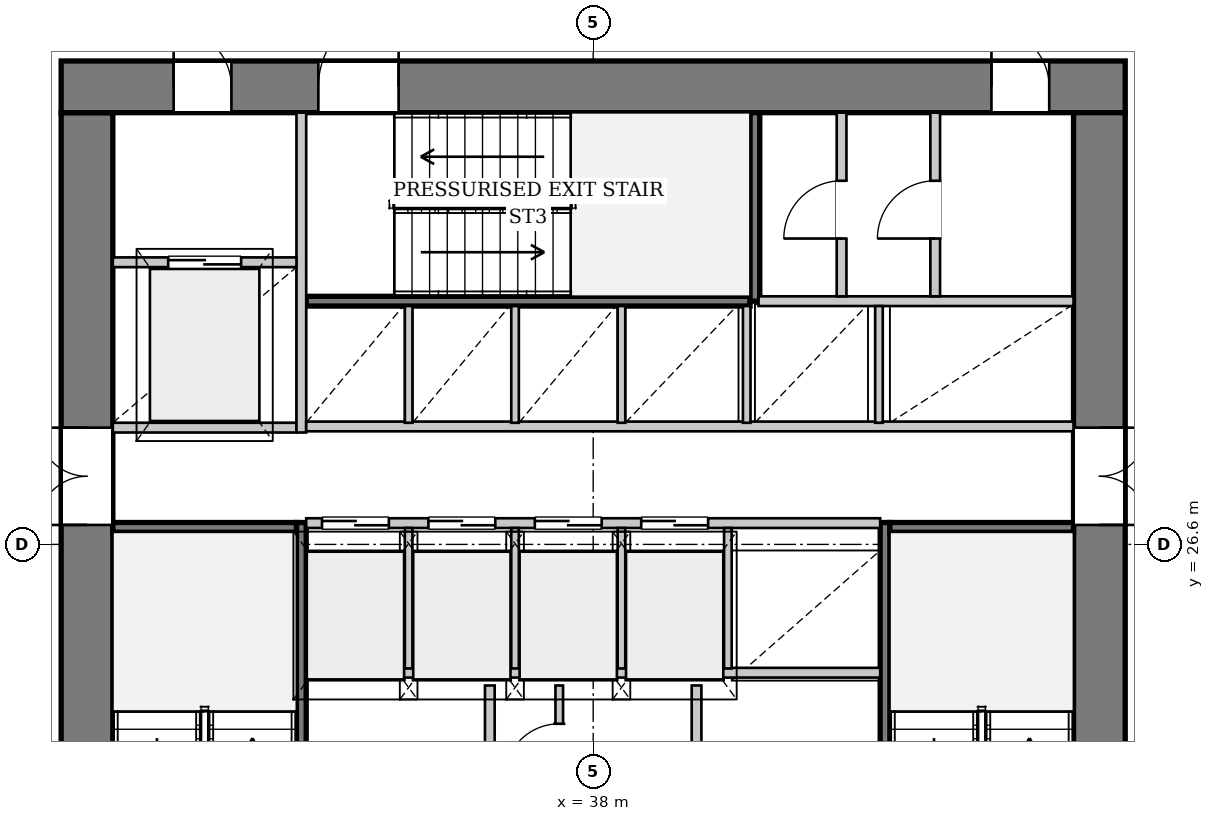
"""IFC4 building model, lengths in metres.
Left out: names, types, materials, properties, quantities, classifications, styles, units other than length and angle.
Written with IfcOpenShell. Run it as: python <this file> out.ifc"""

import sys

from ifc_helpers import new_model, si_unit, direction, frame, frame_2d, origin, place, context, subcontext, project, spatial, rectangle, extrude, source, transform, mapped, element, fill, save


model = new_model("IFC4")
c1 = context("Model", 3, precision=1e-05, world=origin(), true_north=direction((0.0, 1.0)))
c2 = subcontext(c1, "Body", "Model", "MODEL_VIEW")
j1 = project(units=[si_unit("LENGTHUNIT", "METRE"), si_unit("PLANEANGLEUNIT", "RADIAN")], contexts=[c1])
p1 = place(None, origin())
s1 = spatial("IfcSite", under=j1, at=p1, CompositionType="ELEMENT")
p2 = place(p1, origin())
s2 = spatial("IfcBuilding", under=s1, at=p2, CompositionType="ELEMENT")
p3 = place(p2, frame((0.0, 0.0, 36.4)))
s3 = spatial("IfcBuildingStorey", under=s2, at=p3, CompositionType="ELEMENT", Elevation=36.4)
p4 = place(p3, frame((29.675, 19.5, 0.0), z_axis=(0.0, 0.0, 1.0), x_axis=(0.0, 1.0, 0.0)))
e1 = element("IfcWall", 1, at=p4, inside=s3, PredefinedType="SHEAR", context=c2, shape_type="SweptSolid", body=[
    extrude(rectangle(XDim=14.2, YDim=0.85, at=frame_2d((7.1, 0.0))), origin(), (0.0, 0.0, 1.0), 3.3),
])
p5 = place(p4, frame((7.42, 0.0, 0.0)))
e2 = element("IfcOpeningElement", 2, at=p5, cuts=e1, PredefinedType="OPENING", context=c2, shape_type="SweptSolid", body=[
    extrude(rectangle(XDim=1.6, YDim=2.2, at=frame_2d((0.8, 1.1))), frame((0.0, 0.435, 0.0), z_axis=(0.0, -1.0, 0.0), x_axis=(1.0, 0.0, 0.0)), (0.0, 0.0, 1.0), 0.87),
])
p6 = place(p3, frame((29.25, 34.125, 0.0), z_axis=(0.0, 0.0, 1.0), x_axis=(1.0, 0.0, 0.0)))
e3 = element("IfcWall", 3, at=p6, inside=s3, PredefinedType="SHEAR", context=c2, shape_type="SweptSolid", body=[
    extrude(rectangle(XDim=17.5, YDim=0.85, at=frame_2d((8.75, 0.0))), origin(), (0.0, 0.0, 1.0), 3.3),
])
p7 = place(p6, frame((1.85, 0.0, 0.0)))
e4 = element("IfcOpeningElement", 4, at=p7, cuts=e3, PredefinedType="OPENING", context=c2, shape_type="SweptSolid", body=[
    extrude(rectangle(XDim=0.95, YDim=2.1, at=frame_2d((0.475, 1.05))), frame((0.0, 0.435, 0.0), z_axis=(0.0, -1.0, 0.0), x_axis=(1.0, 0.0, 0.0)), (0.0, 0.0, 1.0), 0.87),
])
p8 = place(p6, frame((4.23, 0.0, 0.0)))
e5 = element("IfcOpeningElement", 5, at=p8, cuts=e3, PredefinedType="OPENING", context=c2, shape_type="SweptSolid", body=[
    extrude(rectangle(XDim=1.32, YDim=2.2, at=frame_2d((0.66, 1.1))), frame((0.0, 0.435, 0.0), z_axis=(0.0, -1.0, 0.0), x_axis=(1.0, 0.0, 0.0)), (0.0, 0.0, 1.0), 0.87),
])
p9 = place(p6, frame((15.3, 0.0, 0.0)))
e6 = element("IfcOpeningElement", 6, at=p9, cuts=e3, PredefinedType="OPENING", context=c2, shape_type="SweptSolid", body=[
    extrude(rectangle(XDim=0.95, YDim=2.1, at=frame_2d((0.475, 1.05))), frame((0.0, 0.435, 0.0), z_axis=(0.0, -1.0, 0.0), x_axis=(1.0, 0.0, 0.0)), (0.0, 0.0, 1.0), 0.87),
])
p10 = place(p3, frame((46.325, 33.7, 0.0), z_axis=(0.0, 0.0, 1.0), x_axis=(0.0, -1.0, 0.0)))
e7 = element("IfcWall", 7, at=p10, inside=s3, PredefinedType="SHEAR", context=c2, shape_type="SweptSolid", body=[
    extrude(rectangle(XDim=14.2, YDim=0.85, at=frame_2d((7.1, 0.0))), origin(), (0.0, 0.0, 1.0), 3.3),
])
p11 = place(p10, frame((5.18, 0.0, 0.0)))
e8 = element("IfcOpeningElement", 8, at=p11, cuts=e7, PredefinedType="OPENING", context=c2, shape_type="SweptSolid", body=[
    extrude(rectangle(XDim=1.6, YDim=2.2, at=frame_2d((0.8, 1.1))), frame((0.0, 0.435, 0.0), z_axis=(0.0, -1.0, 0.0), x_axis=(1.0, 0.0, 0.0)), (0.0, 0.0, 1.0), 0.87),
])
p12 = place(p3, frame((33.2, 19.5, 0.0), z_axis=(0.0, 0.0, 1.0), x_axis=(0.0, 1.0, 0.0)))
e9 = element("IfcWall", 9, at=p12, inside=s3, PredefinedType="PARTITIONING", context=c2, shape_type="SweptSolid", body=[
    extrude(rectangle(XDim=7.46, YDim=0.16, at=frame_2d((3.73, 0.0))), origin(), (0.0, 0.0, 1.0), 3.3),
])
p13 = place(p12, frame((0.08, 0.0, 0.0)))
e10 = element("IfcOpeningElement", 10, at=p13, cuts=e9, PredefinedType="OPENING", context=c2, shape_type="SweptSolid", body=[
    extrude(rectangle(XDim=1.32, YDim=2.2, at=frame_2d((0.66, 1.1))), frame((0.0, 0.09, 0.0), z_axis=(0.0, -1.0, 0.0), x_axis=(1.0, 0.0, 0.0)), (0.0, 0.0, 1.0), 0.18),
])
p14 = place(p3, frame((30.1, 26.88, 0.0), z_axis=(0.0, 0.0, 1.0), x_axis=(1.0, 0.0, 0.0)))
e11 = element("IfcWall", 11, at=p14, inside=s3, PredefinedType="PARTITIONING", context=c2, shape_type="SweptSolid", body=[
    extrude(rectangle(XDim=3.02, YDim=0.16, at=frame_2d((1.51, 0.0))), origin(), (0.0, 0.0, 1.0), 3.3),
])
p15 = place(p3, frame((42.8, 26.96, 0.0), z_axis=(0.0, 0.0, 1.0), x_axis=(0.0, -1.0, 0.0)))
e12 = element("IfcWall", 12, at=p15, inside=s3, PredefinedType="PARTITIONING", context=c2, shape_type="SweptSolid", body=[
    extrude(rectangle(XDim=7.46, YDim=0.16, at=frame_2d((3.73, 0.0))), origin(), (0.0, 0.0, 1.0), 3.3),
])
p16 = place(p15, frame((6.06, 0.0, 0.0)))
e13 = element("IfcOpeningElement", 13, at=p16, cuts=e12, PredefinedType="OPENING", context=c2, shape_type="SweptSolid", body=[
    extrude(rectangle(XDim=1.32, YDim=2.2, at=frame_2d((0.66, 1.1))), frame((0.0, 0.09, 0.0), z_axis=(0.0, -1.0, 0.0), x_axis=(1.0, 0.0, 0.0)), (0.0, 0.0, 1.0), 0.18),
])
p17 = place(p3, frame((42.88, 26.88, 0.0), z_axis=(0.0, 0.0, 1.0), x_axis=(1.0, 0.0, 0.0)))
e14 = element("IfcWall", 14, at=p17, inside=s3, PredefinedType="PARTITIONING", context=c2, shape_type="SweptSolid", body=[
    extrude(rectangle(XDim=3.02, YDim=0.16, at=frame_2d((1.51, 0.0))), origin(), (0.0, 0.0, 1.0), 3.3),
])
p18 = place(p3, frame((33.28, 30.6, 0.0), z_axis=(0.0, 0.0, 1.0), x_axis=(1.0, 0.0, 0.0)))
e15 = element("IfcWall", 15, at=p18, inside=s3, PredefinedType="PARTITIONING", context=c2, shape_type="SweptSolid", body=[
    extrude(rectangle(XDim=7.3, YDim=0.16, at=frame_2d((3.65, 0.0))), origin(), (0.0, 0.0, 1.0), 3.3),
])
p19 = place(p3, frame((40.66, 30.6, 0.0), z_axis=(0.0, 0.0, 1.0), x_axis=(0.0, 1.0, 0.0)))
e16 = element("IfcWall", 16, at=p19, inside=s3, PredefinedType="PARTITIONING", context=c2, shape_type="SweptSolid", body=[
    extrude(rectangle(XDim=3.1, YDim=0.16, at=frame_2d((1.55, 0.0))), origin(), (0.0, 0.0, 1.0), 3.3),
])
p20 = place(p3, frame((36.3, 19.5, 0.0), z_axis=(0.0, 0.0, 1.0), x_axis=(0.0, 1.0, 0.0)))
e17 = element("IfcWall", 17, at=p20, inside=s3, PredefinedType="PARTITIONING", context=c2, shape_type="SweptSolid", body=[
    extrude(rectangle(XDim=4.78, YDim=0.16, at=frame_2d((2.39, 0.0))), origin(), (0.0, 0.0, 1.0), 3.3),
])
p21 = place(p20, frame((0.6, 0.0, 0.0)))
e18 = element("IfcOpeningElement", 18, at=p21, cuts=e17, PredefinedType="OPENING", context=c2, shape_type="SweptSolid", body=[
    extrude(rectangle(XDim=1.2, YDim=2.2, at=frame_2d((0.6, 1.1))), frame((0.0, 0.09, 0.0), z_axis=(0.0, -1.0, 0.0), x_axis=(1.0, 0.0, 0.0)), (0.0, 0.0, 1.0), 0.18),
])
p22 = place(p20, frame((2.65, 0.0, 0.0)))
e19 = element("IfcOpeningElement", 19, at=p22, cuts=e17, PredefinedType="OPENING", context=c2, shape_type="SweptSolid", body=[
    extrude(rectangle(XDim=0.95, YDim=2.1, at=frame_2d((0.475, 1.05))), frame((0.0, 0.09, 0.0), z_axis=(0.0, -1.0, 0.0), x_axis=(1.0, 0.0, 0.0)), (0.0, 0.0, 1.0), 0.18),
])
p23 = place(p3, frame((39.7, 24.28, 0.0), z_axis=(0.0, 0.0, 1.0), x_axis=(0.0, -1.0, 0.0)))
e20 = element("IfcWall", 20, at=p23, inside=s3, PredefinedType="PARTITIONING", context=c2, shape_type="SweptSolid", body=[
    extrude(rectangle(XDim=4.78, YDim=0.16, at=frame_2d((2.39, 0.0))), origin(), (0.0, 0.0, 1.0), 3.3),
])
p24 = place(p23, frame((3.12, 0.0, 0.0)))
e21 = element("IfcOpeningElement", 21, at=p24, cuts=e20, PredefinedType="OPENING", context=c2, shape_type="SweptSolid", body=[
    extrude(rectangle(XDim=1.2, YDim=2.2, at=frame_2d((0.6, 1.1))), frame((0.0, 0.09, 0.0), z_axis=(0.0, -1.0, 0.0), x_axis=(1.0, 0.0, 0.0)), (0.0, 0.0, 1.0), 0.18),
])
p25 = place(p3, frame((33.28, 24.49, 0.0), z_axis=(0.0, 0.0, 1.0), x_axis=(1.0, 0.0, 0.0)))
e22 = element("IfcWall", 22, at=p25, inside=s3, PredefinedType="PARTITIONING", context=c2, shape_type="SweptSolid", body=[
    extrude(rectangle(XDim=9.44, YDim=0.16, at=frame_2d((4.72, 0.0))), origin(), (0.0, 0.0, 1.0), 3.3),
])
p26 = place(p3, frame((37.442, 22.1, 0.0), z_axis=(0.0, 0.0, 1.0), x_axis=(0.0, 1.0, 0.0)))
e23 = element("IfcWall", 23, at=p26, inside=s3, PredefinedType="PARTITIONING", context=c2, shape_type="SweptSolid", body=[
    extrude(rectangle(XDim=2.18, YDim=0.125, at=frame_2d((1.09, 0.0))), origin(), (0.0, 0.0, 1.0), 3.3),
])
p27 = place(p26, frame((0.65, 0.0, 0.0)))
e24 = element("IfcOpeningElement", 24, at=p27, cuts=e23, PredefinedType="OPENING", context=c2, shape_type="SweptSolid", body=[
    extrude(rectangle(XDim=0.9, YDim=2.1, at=frame_2d((0.45, 1.05))), frame((0.0, 0.073, 0.0), z_axis=(0.0, -1.0, 0.0), x_axis=(1.0, 0.0, 0.0)), (0.0, 0.0, 1.0), 0.145),
])
p28 = place(p3, frame((30.1, 28.52, 0.0), z_axis=(0.0, 0.0, 1.0), x_axis=(1.0, 0.0, 0.0)))
e25 = element("IfcWall", 25, at=p28, inside=s3, PredefinedType="PARTITIONING", context=c2, shape_type="SweptSolid", body=[
    extrude(rectangle(XDim=3.02, YDim=0.16, at=frame_2d((1.51, 0.0))), origin(), (0.0, 0.0, 1.0), 3.3),
])
p29 = place(p3, frame((33.2, 28.44, 0.0), z_axis=(0.0, 0.0, 1.0), x_axis=(0.0, 1.0, 0.0)))
e26 = element("IfcWall", 26, at=p29, inside=s3, PredefinedType="PARTITIONING", context=c2, shape_type="SweptSolid", body=[
    extrude(rectangle(XDim=5.26, YDim=0.16, at=frame_2d((2.63, 0.0))), origin(), (0.0, 0.0, 1.0), 3.3),
])
p30 = place(p3, frame((30.1, 31.24, 0.0), z_axis=(0.0, 0.0, 1.0), x_axis=(1.0, 0.0, 0.0)))
e27 = element("IfcWall", 27, at=p30, inside=s3, PredefinedType="PARTITIONING", context=c2, shape_type="SweptSolid", body=[
    extrude(rectangle(XDim=3.02, YDim=0.16, at=frame_2d((1.51, 0.0))), origin(), (0.0, 0.0, 1.0), 3.3),
])
p31 = place(p30, frame((0.91, 0.0, 0.0)))
e28 = element("IfcOpeningElement", 28, at=p31, cuts=e27, PredefinedType="OPENING", context=c2, shape_type="SweptSolid", body=[
    extrude(rectangle(XDim=1.2, YDim=2.2, at=frame_2d((0.6, 1.1))), frame((0.0, 0.09, 0.0), z_axis=(0.0, -1.0, 0.0), x_axis=(1.0, 0.0, 0.0)), (0.0, 0.0, 1.0), 0.18),
])
p32 = place(p3, frame((33.28, 26.95, 0.0), z_axis=(0.0, 0.0, 1.0), x_axis=(1.0, 0.0, 0.0)))
e29 = element("IfcWall", 29, at=p32, inside=s3, PredefinedType="PARTITIONING", context=c2, shape_type="SweptSolid", body=[
    extrude(rectangle(XDim=9.44, YDim=0.16, at=frame_2d((4.72, 0.0))), origin(), (0.0, 0.0, 1.0), 3.3),
])
p33 = place(p32, frame((0.26, 0.0, 0.0)))
e30 = element("IfcOpeningElement", 30, at=p33, cuts=e29, PredefinedType="OPENING", context=c2, shape_type="SweptSolid", body=[
    extrude(rectangle(XDim=1.1, YDim=2.2, at=frame_2d((0.55, 1.1))), frame((0.0, 0.09, 0.0), z_axis=(0.0, -1.0, 0.0), x_axis=(1.0, 0.0, 0.0)), (0.0, 0.0, 1.0), 0.18),
])
p34 = place(p32, frame((2.01, 0.0, 0.0)))
e31 = element("IfcOpeningElement", 31, at=p34, cuts=e29, PredefinedType="OPENING", context=c2, shape_type="SweptSolid", body=[
    extrude(rectangle(XDim=1.1, YDim=2.2, at=frame_2d((0.55, 1.1))), frame((0.0, 0.09, 0.0), z_axis=(0.0, -1.0, 0.0), x_axis=(1.0, 0.0, 0.0)), (0.0, 0.0, 1.0), 0.18),
])
p35 = place(p32, frame((3.76, 0.0, 0.0)))
e32 = element("IfcOpeningElement", 32, at=p35, cuts=e29, PredefinedType="OPENING", context=c2, shape_type="SweptSolid", body=[
    extrude(rectangle(XDim=1.1, YDim=2.2, at=frame_2d((0.55, 1.1))), frame((0.0, 0.09, 0.0), z_axis=(0.0, -1.0, 0.0), x_axis=(1.0, 0.0, 0.0)), (0.0, 0.0, 1.0), 0.18),
])
p36 = place(p32, frame((5.51, 0.0, 0.0)))
e33 = element("IfcOpeningElement", 33, at=p36, cuts=e29, PredefinedType="OPENING", context=c2, shape_type="SweptSolid", body=[
    extrude(rectangle(XDim=1.1, YDim=2.2, at=frame_2d((0.55, 1.1))), frame((0.0, 0.09, 0.0), z_axis=(0.0, -1.0, 0.0), x_axis=(1.0, 0.0, 0.0)), (0.0, 0.0, 1.0), 0.18),
])
for number, where, z_axis, x_axis in (
    (34, (34.965, 24.56, 0.0), (0.0, 0.0, 1.0), (0.0, 1.0, 0.0)),
    (35, (36.715, 24.56, 0.0), (0.0, 0.0, 1.0), (0.0, 1.0, 0.0)),
    (36, (38.465, 24.56, 0.0), (0.0, 0.0, 1.0), (0.0, 1.0, 0.0)),
    (37, (40.215, 24.56, 0.0), (0.0, 0.0, 1.0), (0.0, 1.0, 0.0)),
):
    element("IfcWall", number, at=place(p3, frame(where, z_axis=z_axis, x_axis=x_axis)), inside=s3, PredefinedType="PARTITIONING", context=c2, shape_type="SweptSolid", body=[
        extrude(rectangle(XDim=2.31, YDim=0.125, at=frame_2d((1.155, 0.0))), origin(), (0.0, 0.0, 1.0), 3.3),
    ])
p37 = place(p3, frame((33.28, 28.54, 0.0), z_axis=(0.0, 0.0, 1.0), x_axis=(1.0, 0.0, 0.0)))
e38 = element("IfcWall", 38, at=p37, inside=s3, PredefinedType="PARTITIONING", context=c2, shape_type="SweptSolid", body=[
    extrude(rectangle(XDim=12.62, YDim=0.16, at=frame_2d((6.31, 0.0))), origin(), (0.0, 0.0, 1.0), 3.3),
])
p38 = place(p3, frame((40.72, 30.6, 0.0), z_axis=(0.0, 0.0, 1.0), x_axis=(1.0, 0.0, 0.0)))
e39 = element("IfcWall", 39, at=p38, inside=s3, PredefinedType="PARTITIONING", context=c2, shape_type="SweptSolid", body=[
    extrude(rectangle(XDim=5.18, YDim=0.16, at=frame_2d((2.59, 0.0))), origin(), (0.0, 0.0, 1.0), 3.3),
])
for number, where, z_axis, x_axis in (
    (40, (34.965, 28.6, 0.0), (0.0, 0.0, 1.0), (0.0, 1.0, 0.0)),
    (41, (36.715, 28.6, 0.0), (0.0, 0.0, 1.0), (0.0, 1.0, 0.0)),
    (42, (38.465, 28.6, 0.0), (0.0, 0.0, 1.0), (0.0, 1.0, 0.0)),
    (43, (40.525, 28.6, 0.0), (0.0, 0.0, 1.0), (0.0, 1.0, 0.0)),
    (44, (42.7, 28.6, 0.0), (0.0, 0.0, 1.0), (0.0, 1.0, 0.0)),
):
    element("IfcWall", number, at=place(p3, frame(where, z_axis=z_axis, x_axis=x_axis)), inside=s3, PredefinedType="PARTITIONING", context=c2, shape_type="SweptSolid", body=[
        extrude(rectangle(XDim=1.92, YDim=0.125, at=frame_2d((0.96, 0.0))), origin(), (0.0, 0.0, 1.0), 3.3),
    ])
p39 = place(p3, frame((42.085, 30.68, 0.0), z_axis=(0.0, 0.0, 1.0), x_axis=(0.0, 1.0, 0.0)))
e45 = element("IfcWall", 45, at=p39, inside=s3, PredefinedType="PARTITIONING", context=c2, shape_type="SweptSolid", body=[
    extrude(rectangle(XDim=3.02, YDim=0.16, at=frame_2d((1.51, 0.0))), origin(), (0.0, 0.0, 1.0), 3.3),
])
p40 = place(p39, frame((0.95, 0.0, 0.0)))
e46 = element("IfcOpeningElement", 46, at=p40, cuts=e45, PredefinedType="OPENING", context=c2, shape_type="SweptSolid", body=[
    extrude(rectangle(XDim=0.95, YDim=2.1, at=frame_2d((0.475, 1.05))), frame((0.0, 0.09, 0.0), z_axis=(0.0, -1.0, 0.0), x_axis=(1.0, 0.0, 0.0)), (0.0, 0.0, 1.0), 0.18),
])
p41 = place(p3, frame((43.625, 30.68, 0.0), z_axis=(0.0, 0.0, 1.0), x_axis=(0.0, 1.0, 0.0)))
e47 = element("IfcWall", 47, at=p41, inside=s3, PredefinedType="PARTITIONING", context=c2, shape_type="SweptSolid", body=[
    extrude(rectangle(XDim=3.02, YDim=0.16, at=frame_2d((1.51, 0.0))), origin(), (0.0, 0.0, 1.0), 3.3),
])
p42 = place(p41, frame((0.95, 0.0, 0.0)))
e48 = element("IfcOpeningElement", 48, at=p42, cuts=e47, PredefinedType="OPENING", context=c2, shape_type="SweptSolid", body=[
    extrude(rectangle(XDim=0.95, YDim=2.1, at=frame_2d((0.475, 1.05))), frame((0.0, 0.09, 0.0), z_axis=(0.0, -1.0, 0.0), x_axis=(1.0, 0.0, 0.0)), (0.0, 0.0, 1.0), 0.18),
])
m1 = source(origin(), c2, "Body", "SweptSolid", [
    extrude(rectangle(XDim=1.6, YDim=2.2, at=frame_2d((0.8, 1.1))), frame((0.0, 0.025, 0.0), z_axis=(0.0, -1.0, 0.0), x_axis=(1.0, 0.0, 0.0)), (0.0, 0.0, 1.0), 0.05),
])
p43 = place(p5, origin())
e49 = element("IfcDoor", 49, at=p43, inside=s3, OperationType="DOUBLE_DOOR_SINGLE_SWING", PredefinedType="DOOR", context=c2, shape_type="MappedRepresentation", body=[
    mapped(m1, transform((0.0, 0.0, 0.0), x_axis=(1.0, 0.0, 0.0), y_axis=(0.0, 1.0, 0.0), z_axis=(0.0, 0.0, 1.0), scale=1.0)),
])
fill(e2, e49)
m2 = source(origin(), c2, "Body", "SweptSolid", [
    extrude(rectangle(XDim=0.95, YDim=2.1, at=frame_2d((0.475, 1.05))), frame((0.0, 0.025, 0.0), z_axis=(0.0, -1.0, 0.0), x_axis=(1.0, 0.0, 0.0)), (0.0, 0.0, 1.0), 0.05),
])
p44 = place(p7, origin())
e50 = element("IfcDoor", 50, at=p44, inside=s3, OperationType="SINGLE_SWING_LEFT", PredefinedType="DOOR", context=c2, shape_type="MappedRepresentation", body=[
    mapped(m2, transform((0.0, 0.0, 0.0), x_axis=(1.0, 0.0, 0.0), y_axis=(0.0, 1.0, 0.0), z_axis=(0.0, 0.0, 1.0), scale=1.0)),
])
fill(e4, e50)
m3 = source(origin(), c2, "Body", "SweptSolid", [
    extrude(rectangle(XDim=1.32, YDim=2.2, at=frame_2d((0.66, 1.1))), frame((0.0, 0.025, 0.0), z_axis=(0.0, -1.0, 0.0), x_axis=(1.0, 0.0, 0.0)), (0.0, 0.0, 1.0), 0.05),
])
p45 = place(p8, origin())
e51 = element("IfcDoor", 51, at=p45, inside=s3, OperationType="SINGLE_SWING_RIGHT", PredefinedType="DOOR", context=c2, shape_type="MappedRepresentation", body=[
    mapped(m3, transform((0.0, 0.0, 0.0), x_axis=(1.0, 0.0, 0.0), y_axis=(0.0, 1.0, 0.0), z_axis=(0.0, 0.0, 1.0), scale=1.0)),
])
fill(e5, e51)
p46 = place(p11, origin())
e52 = element("IfcDoor", 52, at=p46, inside=s3, OperationType="DOUBLE_DOOR_SINGLE_SWING", PredefinedType="DOOR", context=c2, shape_type="MappedRepresentation", body=[
    mapped(m1, transform((0.0, 0.0, 0.0), x_axis=(1.0, 0.0, 0.0), y_axis=(0.0, 1.0, 0.0), z_axis=(0.0, 0.0, 1.0), scale=1.0)),
])
fill(e8, e52)
m4 = source(origin(), c2, "Body", "SweptSolid", [
    extrude(rectangle(XDim=0.9, YDim=2.1, at=frame_2d((0.45, 1.05))), frame((0.0, 0.025, 0.0), z_axis=(0.0, -1.0, 0.0), x_axis=(1.0, 0.0, 0.0)), (0.0, 0.0, 1.0), 0.05),
])
p47 = place(p27, origin())
e53 = element("IfcDoor", 53, at=p47, inside=s3, OperationType="SINGLE_SWING_LEFT", PredefinedType="DOOR", context=c2, shape_type="MappedRepresentation", body=[
    mapped(m4, transform((0.0, 0.0, 0.0), x_axis=(1.0, 0.0, 0.0), y_axis=(0.0, 1.0, 0.0), z_axis=(0.0, 0.0, 1.0), scale=1.0)),
])
fill(e24, e53)
m5 = source(origin(), c2, "Body", "SweptSolid", [
    extrude(rectangle(XDim=1.2, YDim=2.2, at=frame_2d((0.6, 1.1))), frame((0.0, 0.025, 0.0), z_axis=(0.0, -1.0, 0.0), x_axis=(1.0, 0.0, 0.0)), (0.0, 0.0, 1.0), 0.05),
])
p48 = place(p31, origin())
e54 = element("IfcDoor", 54, at=p48, inside=s3, OperationType="DOUBLE_DOOR_SLIDING", PredefinedType="DOOR", context=c2, shape_type="MappedRepresentation", body=[
    mapped(m5, transform((0.0, 0.0, 0.0), x_axis=(1.0, 0.0, 0.0), y_axis=(0.0, 1.0, 0.0), z_axis=(0.0, 0.0, 1.0), scale=1.0)),
])
fill(e28, e54)
m6 = source(origin(), c2, "Body", "SweptSolid", [
    extrude(rectangle(XDim=1.1, YDim=2.2, at=frame_2d((0.55, 1.1))), frame((0.0, 0.025, 0.0), z_axis=(0.0, -1.0, 0.0), x_axis=(1.0, 0.0, 0.0)), (0.0, 0.0, 1.0), 0.05),
])
p49 = place(p33, origin())
e55 = element("IfcDoor", 55, at=p49, inside=s3, OperationType="DOUBLE_DOOR_SLIDING", PredefinedType="DOOR", context=c2, shape_type="MappedRepresentation", body=[
    mapped(m6, transform((0.0, 0.0, 0.0), x_axis=(1.0, 0.0, 0.0), y_axis=(0.0, 1.0, 0.0), z_axis=(0.0, 0.0, 1.0), scale=1.0)),
])
fill(e30, e55)
p50 = place(p34, origin())
e56 = element("IfcDoor", 56, at=p50, inside=s3, OperationType="DOUBLE_DOOR_SLIDING", PredefinedType="DOOR", context=c2, shape_type="MappedRepresentation", body=[
    mapped(m6, transform((0.0, 0.0, 0.0), x_axis=(1.0, 0.0, 0.0), y_axis=(0.0, 1.0, 0.0), z_axis=(0.0, 0.0, 1.0), scale=1.0)),
])
fill(e31, e56)
p51 = place(p35, origin())
e57 = element("IfcDoor", 57, at=p51, inside=s3, OperationType="DOUBLE_DOOR_SLIDING", PredefinedType="DOOR", context=c2, shape_type="MappedRepresentation", body=[
    mapped(m6, transform((0.0, 0.0, 0.0), x_axis=(1.0, 0.0, 0.0), y_axis=(0.0, 1.0, 0.0), z_axis=(0.0, 0.0, 1.0), scale=1.0)),
])
fill(e32, e57)
p52 = place(p36, origin())
e58 = element("IfcDoor", 58, at=p52, inside=s3, OperationType="DOUBLE_DOOR_SLIDING", PredefinedType="DOOR", context=c2, shape_type="MappedRepresentation", body=[
    mapped(m6, transform((0.0, 0.0, 0.0), x_axis=(1.0, 0.0, 0.0), y_axis=(0.0, 1.0, 0.0), z_axis=(0.0, 0.0, 1.0), scale=1.0)),
])
fill(e33, e58)
p53 = place(p40, origin())
e59 = element("IfcDoor", 59, at=p53, inside=s3, OperationType="SINGLE_SWING_LEFT", PredefinedType="DOOR", context=c2, shape_type="MappedRepresentation", body=[
    mapped(m2, transform((0.0, 0.0, 0.0), x_axis=(1.0, 0.0, 0.0), y_axis=(0.0, 1.0, 0.0), z_axis=(0.0, 0.0, 1.0), scale=1.0)),
])
fill(e46, e59)
p54 = place(p42, origin())
e60 = element("IfcDoor", 60, at=p54, inside=s3, OperationType="SINGLE_SWING_LEFT", PredefinedType="DOOR", context=c2, shape_type="MappedRepresentation", body=[
    mapped(m2, transform((0.0, 0.0, 0.0), x_axis=(1.0, 0.0, 0.0), y_axis=(0.0, 1.0, 0.0), z_axis=(0.0, 0.0, 1.0), scale=1.0)),
])
fill(e48, e60)
p55 = place(p9, origin())
e61 = element("IfcDoor", 61, at=p55, inside=s3, OperationType="SINGLE_SWING_LEFT", PredefinedType="DOOR", context=c2, shape_type="MappedRepresentation", body=[
    mapped(m2, transform((0.0, 0.0, 0.0), x_axis=(1.0, 0.0, 0.0), y_axis=(0.0, 1.0, 0.0), z_axis=(0.0, 0.0, 1.0), scale=1.0)),
])
fill(e6, e61)
save(model, sys.argv[1])
